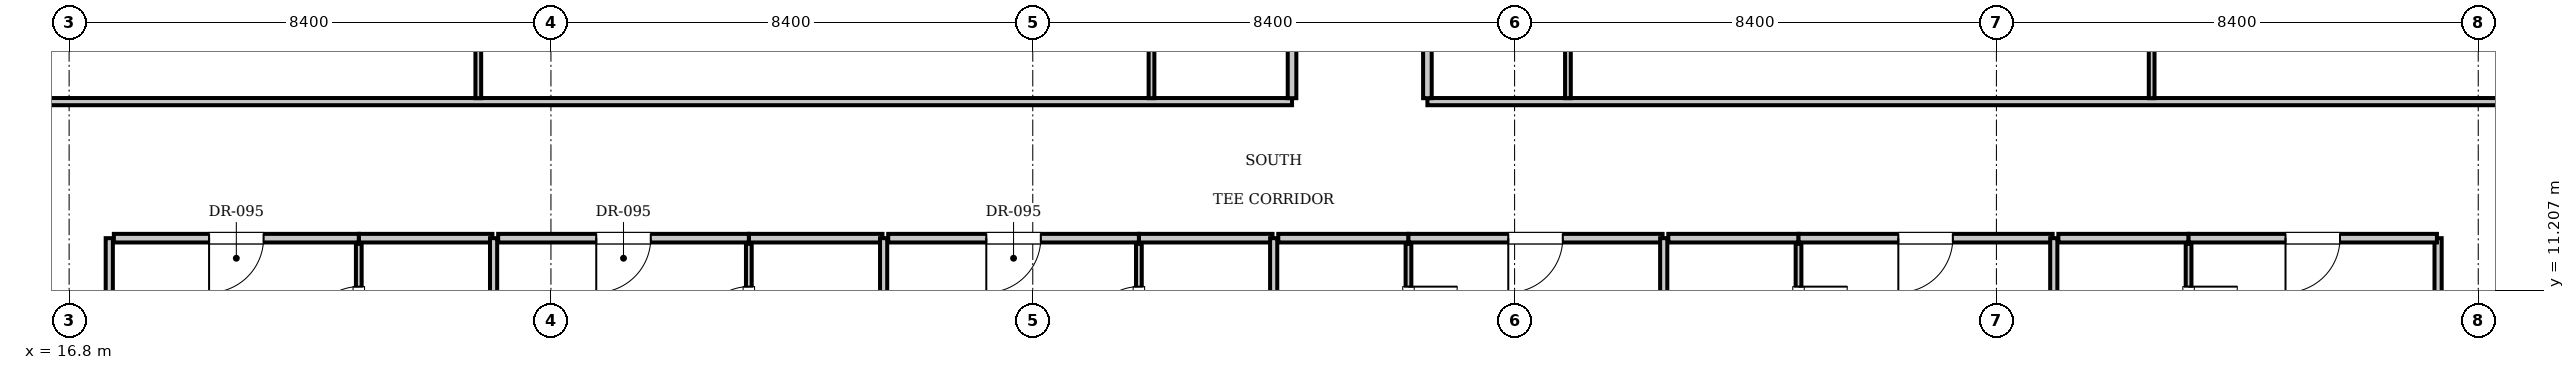
"""IFC4 building model, lengths in metres.
Left out: names, types, materials, properties, quantities, classifications, styles, units other than length and angle.
Written with IfcOpenShell. Run it as: python <this file> out.ifc"""

import sys

from ifc_helpers import new_model, si_unit, direction, frame, frame_2d, origin, place, context, subcontext, project, spatial, rectangle, extrude, element, fill, save


model = new_model("IFC4")
c1 = context("Model", 3, precision=1e-05, world=origin(), true_north=direction((0.0, 1.0)))
c2 = subcontext(c1, "Body", "Model", "MODEL_VIEW")
j1 = project(units=[si_unit("LENGTHUNIT", "METRE"), si_unit("PLANEANGLEUNIT", "RADIAN")], contexts=[c1])
p1 = place(None, origin())
s1 = spatial("IfcSite", under=j1, at=p1, CompositionType="ELEMENT")
p2 = place(p1, origin())
s2 = spatial("IfcBuilding", under=s1, at=p2, CompositionType="ELEMENT")
p3 = place(p2, frame((0.0, 0.0, 150.5)))
s3 = spatial("IfcBuildingStorey", under=s2, at=p3, CompositionType="ELEMENT", Elevation=150.5)
for number, where, z_axis, x_axis in (
    (1, (17.5, 9.0, 0.0), (0.0, 0.0, 1.0), (0.0, 1.0, 0.0)),
    (2, (58.1, 9.0, 0.0), (0.0, 0.0, 1.0), (0.0, 1.0, 0.0)),
):
    element("IfcWall", number, at=place(p3, frame(where, z_axis=z_axis, x_axis=x_axis)), inside=s3, PredefinedType="PARTITIONING", context=c2, shape_type="SweptSolid", body=[
        extrude(rectangle(XDim=3.12, YDim=0.125, at=frame_2d((1.56, 0.0))), origin(), (0.0, 0.0, 1.0), 3.61),
    ])
p4 = place(p3, frame((21.85, 12.12, 0.0), z_axis=(0.0, 0.0, 1.0), x_axis=(1.0, 0.0, 0.0)))
e3 = element("IfcWall", 3, at=p4, inside=s3, PredefinedType="PARTITIONING", context=c2, shape_type="SweptSolid", body=[
    extrude(rectangle(XDim=2.33, YDim=0.15, at=frame_2d((1.165, 0.0))), origin(), (0.0, 0.0, 1.0), 3.61),
])
p5 = place(p3, frame((21.85, 9.68, 0.0), z_axis=(0.0, 0.0, 1.0), x_axis=(0.0, 1.0, 0.0)))
e4 = element("IfcWall", 4, at=p5, inside=s3, PredefinedType="PARTITIONING", context=c2, shape_type="SweptSolid", body=[
    extrude(rectangle(XDim=2.34, YDim=0.1, at=frame_2d((1.17, 0.0))), origin(), (0.0, 0.0, 1.0), 3.61),
])
p6 = place(p5, frame((0.745, 0.0, 0.0)))
e5 = element("IfcOpeningElement", 5, at=p6, cuts=e4, PredefinedType="OPENING", context=c2, shape_type="SweptSolid", body=[
    extrude(rectangle(XDim=0.85, YDim=2.1, at=frame_2d((0.425, 1.05))), frame((0.0, 0.06, 0.0), z_axis=(0.0, -1.0, 0.0), x_axis=(1.0, 0.0, 0.0)), (0.0, 0.0, 1.0), 0.12),
])
p7 = place(p3, frame((17.58, 12.12, 0.0), z_axis=(0.0, 0.0, 1.0), x_axis=(1.0, 0.0, 0.0)))
e6 = element("IfcWall", 6, at=p7, inside=s3, PredefinedType="PARTITIONING", context=c2, shape_type="SweptSolid", body=[
    extrude(rectangle(XDim=4.27, YDim=0.15, at=frame_2d((2.135, 0.0))), origin(), (0.0, 0.0, 1.0), 3.61),
])
p8 = place(p7, frame((1.66, 0.0, 0.0)))
e7 = element("IfcOpeningElement", 7, at=p8, cuts=e6, PredefinedType="OPENING", context=c2, shape_type="SweptSolid", body=[
    extrude(rectangle(XDim=0.95, YDim=2.15, at=frame_2d((0.475, 1.075))), frame((0.0, 0.085, 0.0), z_axis=(0.0, -1.0, 0.0), x_axis=(1.0, 0.0, 0.0)), (0.0, 0.0, 1.0), 0.17),
])
p9 = place(p3, frame((24.2, 4.7, 0.0), z_axis=(0.0, 0.0, 1.0), x_axis=(0.0, 1.0, 0.0)))
e8 = element("IfcWall", 8, at=p9, inside=s3, PredefinedType="PARTITIONING", context=c2, shape_type="SweptSolid", body=[
    extrude(rectangle(XDim=7.42, YDim=0.125, at=frame_2d((3.71, 0.0))), origin(), (0.0, 0.0, 1.0), 3.61),
])
p10 = place(p3, frame((28.65, 12.12, 0.0), z_axis=(0.0, 0.0, 1.0), x_axis=(1.0, 0.0, 0.0)))
e9 = element("IfcWall", 9, at=p10, inside=s3, PredefinedType="PARTITIONING", context=c2, shape_type="SweptSolid", body=[
    extrude(rectangle(XDim=2.33, YDim=0.15, at=frame_2d((1.165, 0.0))), origin(), (0.0, 0.0, 1.0), 3.61),
])
p11 = place(p3, frame((28.65, 9.68, 0.0), z_axis=(0.0, 0.0, 1.0), x_axis=(0.0, 1.0, 0.0)))
e10 = element("IfcWall", 10, at=p11, inside=s3, PredefinedType="PARTITIONING", context=c2, shape_type="SweptSolid", body=[
    extrude(rectangle(XDim=2.34, YDim=0.1, at=frame_2d((1.17, 0.0))), origin(), (0.0, 0.0, 1.0), 3.61),
])
p12 = place(p11, frame((0.745, 0.0, 0.0)))
e11 = element("IfcOpeningElement", 11, at=p12, cuts=e10, PredefinedType="OPENING", context=c2, shape_type="SweptSolid", body=[
    extrude(rectangle(XDim=0.85, YDim=2.1, at=frame_2d((0.425, 1.05))), frame((0.0, 0.06, 0.0), z_axis=(0.0, -1.0, 0.0), x_axis=(1.0, 0.0, 0.0)), (0.0, 0.0, 1.0), 0.12),
])
p13 = place(p3, frame((24.28, 12.12, 0.0), z_axis=(0.0, 0.0, 1.0), x_axis=(1.0, 0.0, 0.0)))
e12 = element("IfcWall", 12, at=p13, inside=s3, PredefinedType="PARTITIONING", context=c2, shape_type="SweptSolid", body=[
    extrude(rectangle(XDim=4.37, YDim=0.15, at=frame_2d((2.185, 0.0))), origin(), (0.0, 0.0, 1.0), 3.61),
])
p14 = place(p13, frame((1.71, 0.0, 0.0)))
e13 = element("IfcOpeningElement", 13, at=p14, cuts=e12, PredefinedType="OPENING", context=c2, shape_type="SweptSolid", body=[
    extrude(rectangle(XDim=0.95, YDim=2.15, at=frame_2d((0.475, 1.075))), frame((0.0, 0.085, 0.0), z_axis=(0.0, -1.0, 0.0), x_axis=(1.0, 0.0, 0.0)), (0.0, 0.0, 1.0), 0.17),
])
p15 = place(p3, frame((31.0, 4.7, 0.0), z_axis=(0.0, 0.0, 1.0), x_axis=(0.0, 1.0, 0.0)))
e14 = element("IfcWall", 14, at=p15, inside=s3, PredefinedType="PARTITIONING", context=c2, shape_type="SweptSolid", body=[
    extrude(rectangle(XDim=7.42, YDim=0.125, at=frame_2d((3.71, 0.0))), origin(), (0.0, 0.0, 1.0), 3.61),
])
p16 = place(p3, frame((35.45, 12.12, 0.0), z_axis=(0.0, 0.0, 1.0), x_axis=(1.0, 0.0, 0.0)))
e15 = element("IfcWall", 15, at=p16, inside=s3, PredefinedType="PARTITIONING", context=c2, shape_type="SweptSolid", body=[
    extrude(rectangle(XDim=2.33, YDim=0.15, at=frame_2d((1.165, 0.0))), origin(), (0.0, 0.0, 1.0), 3.61),
])
p17 = place(p3, frame((35.45, 9.68, 0.0), z_axis=(0.0, 0.0, 1.0), x_axis=(0.0, 1.0, 0.0)))
e16 = element("IfcWall", 16, at=p17, inside=s3, PredefinedType="PARTITIONING", context=c2, shape_type="SweptSolid", body=[
    extrude(rectangle(XDim=2.34, YDim=0.1, at=frame_2d((1.17, 0.0))), origin(), (0.0, 0.0, 1.0), 3.61),
])
p18 = place(p17, frame((0.745, 0.0, 0.0)))
e17 = element("IfcOpeningElement", 17, at=p18, cuts=e16, PredefinedType="OPENING", context=c2, shape_type="SweptSolid", body=[
    extrude(rectangle(XDim=0.85, YDim=2.1, at=frame_2d((0.425, 1.05))), frame((0.0, 0.06, 0.0), z_axis=(0.0, -1.0, 0.0), x_axis=(1.0, 0.0, 0.0)), (0.0, 0.0, 1.0), 0.12),
])
p19 = place(p3, frame((31.08, 12.12, 0.0), z_axis=(0.0, 0.0, 1.0), x_axis=(1.0, 0.0, 0.0)))
e18 = element("IfcWall", 18, at=p19, inside=s3, PredefinedType="PARTITIONING", context=c2, shape_type="SweptSolid", body=[
    extrude(rectangle(XDim=4.37, YDim=0.15, at=frame_2d((2.185, 0.0))), origin(), (0.0, 0.0, 1.0), 3.61),
])
p20 = place(p19, frame((1.71, 0.0, 0.0)))
e19 = element("IfcOpeningElement", 19, at=p20, cuts=e18, PredefinedType="OPENING", context=c2, shape_type="SweptSolid", body=[
    extrude(rectangle(XDim=0.95, YDim=2.15, at=frame_2d((0.475, 1.075))), frame((0.0, 0.085, 0.0), z_axis=(0.0, -1.0, 0.0), x_axis=(1.0, 0.0, 0.0)), (0.0, 0.0, 1.0), 0.17),
])
p21 = place(p3, frame((37.8, 4.7, 0.0), z_axis=(0.0, 0.0, 1.0), x_axis=(0.0, 1.0, 0.0)))
e20 = element("IfcWall", 20, at=p21, inside=s3, PredefinedType="PARTITIONING", context=c2, shape_type="SweptSolid", body=[
    extrude(rectangle(XDim=7.42, YDim=0.125, at=frame_2d((3.71, 0.0))), origin(), (0.0, 0.0, 1.0), 3.293),
])
p22 = place(p3, frame((37.88, 12.12, 0.0), z_axis=(0.0, 0.0, 1.0), x_axis=(1.0, 0.0, 0.0)))
e21 = element("IfcWall", 21, at=p22, inside=s3, PredefinedType="PARTITIONING", context=c2, shape_type="SweptSolid", body=[
    extrude(rectangle(XDim=2.27, YDim=0.15, at=frame_2d((1.135, 0.0))), origin(), (0.0, 0.0, 1.0), 3.61),
])
p23 = place(p3, frame((40.15, 9.68, 0.0), z_axis=(0.0, 0.0, 1.0), x_axis=(0.0, 1.0, 0.0)))
e22 = element("IfcWall", 22, at=p23, inside=s3, PredefinedType="PARTITIONING", context=c2, shape_type="SweptSolid", body=[
    extrude(rectangle(XDim=2.34, YDim=0.1, at=frame_2d((1.17, 0.0))), origin(), (0.0, 0.0, 1.0), 3.61),
])
p24 = place(p23, frame((0.745, 0.0, 0.0)))
e23 = element("IfcOpeningElement", 23, at=p24, cuts=e22, PredefinedType="OPENING", context=c2, shape_type="SweptSolid", body=[
    extrude(rectangle(XDim=0.85, YDim=2.1, at=frame_2d((0.425, 1.05))), frame((0.0, 0.06, 0.0), z_axis=(0.0, -1.0, 0.0), x_axis=(1.0, 0.0, 0.0)), (0.0, 0.0, 1.0), 0.12),
])
p25 = place(p3, frame((40.15, 12.12, 0.0), z_axis=(0.0, 0.0, 1.0), x_axis=(1.0, 0.0, 0.0)))
e24 = element("IfcWall", 24, at=p25, inside=s3, PredefinedType="PARTITIONING", context=c2, shape_type="SweptSolid", body=[
    extrude(rectangle(XDim=4.43, YDim=0.15, at=frame_2d((2.215, 0.0))), origin(), (0.0, 0.0, 1.0), 3.61),
])
p26 = place(p25, frame((1.74, 0.0, 0.0)))
e25 = element("IfcOpeningElement", 25, at=p26, cuts=e24, PredefinedType="OPENING", context=c2, shape_type="SweptSolid", body=[
    extrude(rectangle(XDim=0.95, YDim=2.15, at=frame_2d((0.475, 1.075))), frame((0.0, 0.085, 0.0), z_axis=(0.0, -1.0, 0.0), x_axis=(1.0, 0.0, 0.0)), (0.0, 0.0, 1.0), 0.17),
])
p27 = place(p3, frame((44.6, 4.7, 0.0), z_axis=(0.0, 0.0, 1.0), x_axis=(0.0, 1.0, 0.0)))
e26 = element("IfcWall", 26, at=p27, inside=s3, PredefinedType="PARTITIONING", context=c2, shape_type="SweptSolid", body=[
    extrude(rectangle(XDim=7.42, YDim=0.125, at=frame_2d((3.71, 0.0))), origin(), (0.0, 0.0, 1.0), 3.61),
])
p28 = place(p3, frame((44.68, 12.12, 0.0), z_axis=(0.0, 0.0, 1.0), x_axis=(1.0, 0.0, 0.0)))
e27 = element("IfcWall", 27, at=p28, inside=s3, PredefinedType="PARTITIONING", context=c2, shape_type="SweptSolid", body=[
    extrude(rectangle(XDim=2.27, YDim=0.15, at=frame_2d((1.135, 0.0))), origin(), (0.0, 0.0, 1.0), 3.61),
])
p29 = place(p3, frame((46.95, 9.68, 0.0), z_axis=(0.0, 0.0, 1.0), x_axis=(0.0, 1.0, 0.0)))
e28 = element("IfcWall", 28, at=p29, inside=s3, PredefinedType="PARTITIONING", context=c2, shape_type="SweptSolid", body=[
    extrude(rectangle(XDim=2.34, YDim=0.1, at=frame_2d((1.17, 0.0))), origin(), (0.0, 0.0, 1.0), 3.61),
])
p30 = place(p29, frame((0.745, 0.0, 0.0)))
e29 = element("IfcOpeningElement", 29, at=p30, cuts=e28, PredefinedType="OPENING", context=c2, shape_type="SweptSolid", body=[
    extrude(rectangle(XDim=0.85, YDim=2.1, at=frame_2d((0.425, 1.05))), frame((0.0, 0.06, 0.0), z_axis=(0.0, -1.0, 0.0), x_axis=(1.0, 0.0, 0.0)), (0.0, 0.0, 1.0), 0.12),
])
p31 = place(p3, frame((46.95, 12.12, 0.0), z_axis=(0.0, 0.0, 1.0), x_axis=(1.0, 0.0, 0.0)))
e30 = element("IfcWall", 30, at=p31, inside=s3, PredefinedType="PARTITIONING", context=c2, shape_type="SweptSolid", body=[
    extrude(rectangle(XDim=4.43, YDim=0.15, at=frame_2d((2.215, 0.0))), origin(), (0.0, 0.0, 1.0), 3.61),
])
p32 = place(p31, frame((1.74, 0.0, 0.0)))
e31 = element("IfcOpeningElement", 31, at=p32, cuts=e30, PredefinedType="OPENING", context=c2, shape_type="SweptSolid", body=[
    extrude(rectangle(XDim=0.95, YDim=2.15, at=frame_2d((0.475, 1.075))), frame((0.0, 0.085, 0.0), z_axis=(0.0, -1.0, 0.0), x_axis=(1.0, 0.0, 0.0)), (0.0, 0.0, 1.0), 0.17),
])
p33 = place(p3, frame((51.4, 4.7, 0.0), z_axis=(0.0, 0.0, 1.0), x_axis=(0.0, 1.0, 0.0)))
e32 = element("IfcWall", 32, at=p33, inside=s3, PredefinedType="PARTITIONING", context=c2, shape_type="SweptSolid", body=[
    extrude(rectangle(XDim=7.42, YDim=0.125, at=frame_2d((3.71, 0.0))), origin(), (0.0, 0.0, 1.0), 3.61),
])
p34 = place(p3, frame((51.48, 12.12, 0.0), z_axis=(0.0, 0.0, 1.0), x_axis=(1.0, 0.0, 0.0)))
e33 = element("IfcWall", 33, at=p34, inside=s3, PredefinedType="PARTITIONING", context=c2, shape_type="SweptSolid", body=[
    extrude(rectangle(XDim=2.27, YDim=0.15, at=frame_2d((1.135, 0.0))), origin(), (0.0, 0.0, 1.0), 3.61),
])
p35 = place(p3, frame((53.75, 9.68, 0.0), z_axis=(0.0, 0.0, 1.0), x_axis=(0.0, 1.0, 0.0)))
e34 = element("IfcWall", 34, at=p35, inside=s3, PredefinedType="PARTITIONING", context=c2, shape_type="SweptSolid", body=[
    extrude(rectangle(XDim=2.34, YDim=0.1, at=frame_2d((1.17, 0.0))), origin(), (0.0, 0.0, 1.0), 3.61),
])
p36 = place(p35, frame((0.745, 0.0, 0.0)))
e35 = element("IfcOpeningElement", 35, at=p36, cuts=e34, PredefinedType="OPENING", context=c2, shape_type="SweptSolid", body=[
    extrude(rectangle(XDim=0.85, YDim=2.1, at=frame_2d((0.425, 1.05))), frame((0.0, 0.06, 0.0), z_axis=(0.0, -1.0, 0.0), x_axis=(1.0, 0.0, 0.0)), (0.0, 0.0, 1.0), 0.12),
])
p37 = place(p3, frame((53.75, 12.12, 0.0), z_axis=(0.0, 0.0, 1.0), x_axis=(1.0, 0.0, 0.0)))
e36 = element("IfcWall", 36, at=p37, inside=s3, PredefinedType="PARTITIONING", context=c2, shape_type="SweptSolid", body=[
    extrude(rectangle(XDim=4.33, YDim=0.15, at=frame_2d((2.165, 0.0))), origin(), (0.0, 0.0, 1.0), 3.61),
])
p38 = place(p37, frame((1.69, 0.0, 0.0)))
e37 = element("IfcOpeningElement", 37, at=p38, cuts=e36, PredefinedType="OPENING", context=c2, shape_type="SweptSolid", body=[
    extrude(rectangle(XDim=0.95, YDim=2.15, at=frame_2d((0.475, 1.075))), frame((0.0, 0.085, 0.0), z_axis=(0.0, -1.0, 0.0), x_axis=(1.0, 0.0, 0.0)), (0.0, 0.0, 1.0), 0.17),
])
p39 = place(p3, frame((13.2, 14.5, 0.0), z_axis=(0.0, 0.0, 1.0), x_axis=(1.0, 0.0, 0.0)))
e38 = element("IfcWall", 38, at=p39, inside=s3, PredefinedType="PARTITIONING", context=c2, shape_type="SweptSolid", body=[
    extrude(rectangle(XDim=24.92, YDim=0.125, at=frame_2d((12.46, 0.0))), origin(), (0.0, 0.0, 1.0), 3.61),
])
p40 = place(p3, frame((40.48, 14.5, 0.0), z_axis=(0.0, 0.0, 1.0), x_axis=(1.0, 0.0, 0.0)))
e39 = element("IfcWall", 39, at=p40, inside=s3, PredefinedType="PARTITIONING", context=c2, shape_type="SweptSolid", body=[
    extrude(rectangle(XDim=21.92, YDim=0.125, at=frame_2d((10.96, 0.0))), origin(), (0.0, 0.0, 1.0), 3.61),
])
p41 = place(p3, frame((38.12, 14.56, 0.0), z_axis=(0.0, 0.0, 1.0), x_axis=(0.0, 1.0, 0.0)))
e40 = element("IfcWall", 40, at=p41, inside=s3, PredefinedType="PARTITIONING", context=c2, shape_type="SweptSolid", body=[
    extrude(rectangle(XDim=1.93, YDim=0.15, at=frame_2d((0.965, 0.0))), origin(), (0.0, 0.0, 1.0), 3.61),
])
p42 = place(p3, frame((35.67, 14.56, 0.0), z_axis=(0.0, 0.0, 1.0), x_axis=(0.0, 1.0, 0.0)))
e41 = element("IfcWall", 41, at=p42, inside=s3, PredefinedType="PARTITIONING", context=c2, shape_type="SweptSolid", body=[
    extrude(rectangle(XDim=1.93, YDim=0.1, at=frame_2d((0.965, 0.0))), origin(), (0.0, 0.0, 1.0), 3.61),
])
p43 = place(p3, frame((23.934, 14.56, 0.0), z_axis=(0.0, 0.0, 1.0), x_axis=(0.0, 1.0, 0.0)))
e42 = element("IfcWall", 42, at=p43, inside=s3, PredefinedType="PARTITIONING", context=c2, shape_type="SweptSolid", body=[
    extrude(rectangle(XDim=5.41, YDim=0.1, at=frame_2d((2.705, 0.0))), origin(), (0.0, 0.0, 1.0), 3.61),
])
p44 = place(p43, frame((1.775, 0.0, 0.0)))
e43 = element("IfcOpeningElement", 43, at=p44, cuts=e42, PredefinedType="OPENING", context=c2, shape_type="SweptSolid", body=[
    extrude(rectangle(XDim=0.9, YDim=2.1, at=frame_2d((0.45, 1.05))), frame((0.0, 0.06, 0.0), z_axis=(0.0, -1.0, 0.0), x_axis=(1.0, 0.0, 0.0)), (0.0, 0.0, 1.0), 0.12),
])
p45 = place(p3, frame((40.48, 14.56, 0.0), z_axis=(0.0, 0.0, 1.0), x_axis=(0.0, 1.0, 0.0)))
e44 = element("IfcWall", 44, at=p45, inside=s3, PredefinedType="PARTITIONING", context=c2, shape_type="SweptSolid", body=[
    extrude(rectangle(XDim=1.93, YDim=0.15, at=frame_2d((0.965, 0.0))), origin(), (0.0, 0.0, 1.0), 3.61),
])
p46 = place(p3, frame((42.93, 14.56, 0.0), z_axis=(0.0, 0.0, 1.0), x_axis=(0.0, 1.0, 0.0)))
e45 = element("IfcWall", 45, at=p46, inside=s3, PredefinedType="PARTITIONING", context=c2, shape_type="SweptSolid", body=[
    extrude(rectangle(XDim=1.93, YDim=0.1, at=frame_2d((0.965, 0.0))), origin(), (0.0, 0.0, 1.0), 3.61),
])
p47 = place(p3, frame((53.106, 14.56, 0.0), z_axis=(0.0, 0.0, 1.0), x_axis=(0.0, 1.0, 0.0)))
e46 = element("IfcWall", 46, at=p47, inside=s3, PredefinedType="PARTITIONING", context=c2, shape_type="SweptSolid", body=[
    extrude(rectangle(XDim=5.41, YDim=0.1, at=frame_2d((2.705, 0.0))), origin(), (0.0, 0.0, 1.0), 3.61),
])
p48 = place(p47, frame((2.255, 0.0, 0.0)))
e47 = element("IfcOpeningElement", 47, at=p48, cuts=e46, PredefinedType="OPENING", context=c2, shape_type="SweptSolid", body=[
    extrude(rectangle(XDim=0.9, YDim=2.1, at=frame_2d((0.45, 1.05))), frame((0.0, 0.06, 0.0), z_axis=(0.0, -1.0, 0.0), x_axis=(1.0, 0.0, 0.0)), (0.0, 0.0, 1.0), 0.12),
])
p49 = place(p6, origin())
e48 = element("IfcDoor", 48, at=p49, inside=s3, OperationType="SINGLE_SWING_LEFT", PredefinedType="DOOR", context=c2, shape_type="SweptSolid", body=[
    extrude(rectangle(XDim=0.85, YDim=2.1, at=frame_2d((0.425, 1.05))), frame((0.0, 0.025, 0.0), z_axis=(0.0, -1.0, 0.0), x_axis=(1.0, 0.0, 0.0)), (0.0, 0.0, 1.0), 0.05),
])
fill(e5, e48)
p50 = place(p8, frame((0.95, 0.0, 0.0), z_axis=(0.0, 0.0, 1.0), x_axis=(-1.0, 0.0, 0.0)))
e49 = element("IfcDoor", 49, at=p50, inside=s3, OperationType="SINGLE_SWING_RIGHT", PredefinedType="DOOR", context=c2, shape_type="SweptSolid", body=[
    extrude(rectangle(XDim=0.95, YDim=2.15, at=frame_2d((0.475, 1.075))), frame((0.0, 0.025, 0.0), z_axis=(0.0, -1.0, 0.0), x_axis=(1.0, 0.0, 0.0)), (0.0, 0.0, 1.0), 0.05),
])
fill(e7, e49)
p51 = place(p12, origin())
e50 = element("IfcDoor", 50, at=p51, inside=s3, OperationType="SINGLE_SWING_LEFT", PredefinedType="DOOR", context=c2, shape_type="SweptSolid", body=[
    extrude(rectangle(XDim=0.85, YDim=2.1, at=frame_2d((0.425, 1.05))), frame((0.0, 0.025, 0.0), z_axis=(0.0, -1.0, 0.0), x_axis=(1.0, 0.0, 0.0)), (0.0, 0.0, 1.0), 0.05),
])
fill(e11, e50)
p52 = place(p14, frame((0.95, 0.0, 0.0), z_axis=(0.0, 0.0, 1.0), x_axis=(-1.0, 0.0, 0.0)))
e51 = element("IfcDoor", 51, at=p52, inside=s3, OperationType="SINGLE_SWING_RIGHT", PredefinedType="DOOR", context=c2, shape_type="SweptSolid", body=[
    extrude(rectangle(XDim=0.95, YDim=2.15, at=frame_2d((0.475, 1.075))), frame((0.0, 0.025, 0.0), z_axis=(0.0, -1.0, 0.0), x_axis=(1.0, 0.0, 0.0)), (0.0, 0.0, 1.0), 0.05),
])
fill(e13, e51)
p53 = place(p18, origin())
e52 = element("IfcDoor", 52, at=p53, inside=s3, OperationType="SINGLE_SWING_LEFT", PredefinedType="DOOR", context=c2, shape_type="SweptSolid", body=[
    extrude(rectangle(XDim=0.85, YDim=2.1, at=frame_2d((0.425, 1.05))), frame((0.0, 0.025, 0.0), z_axis=(0.0, -1.0, 0.0), x_axis=(1.0, 0.0, 0.0)), (0.0, 0.0, 1.0), 0.05),
])
fill(e17, e52)
p54 = place(p20, frame((0.95, 0.0, 0.0), z_axis=(0.0, 0.0, 1.0), x_axis=(-1.0, 0.0, 0.0)))
e53 = element("IfcDoor", 53, at=p54, inside=s3, OperationType="SINGLE_SWING_RIGHT", PredefinedType="DOOR", context=c2, shape_type="SweptSolid", body=[
    extrude(rectangle(XDim=0.95, YDim=2.15, at=frame_2d((0.475, 1.075))), frame((0.0, 0.025, 0.0), z_axis=(0.0, -1.0, 0.0), x_axis=(1.0, 0.0, 0.0)), (0.0, 0.0, 1.0), 0.05),
])
fill(e19, e53)
p55 = place(p24, frame((0.85, 0.0, 0.0), z_axis=(0.0, 0.0, 1.0), x_axis=(-1.0, 0.0, 0.0)))
e54 = element("IfcDoor", 54, at=p55, inside=s3, OperationType="SINGLE_SWING_LEFT", PredefinedType="DOOR", context=c2, shape_type="SweptSolid", body=[
    extrude(rectangle(XDim=0.85, YDim=2.1, at=frame_2d((0.425, 1.05))), frame((0.0, 0.025, 0.0), z_axis=(0.0, -1.0, 0.0), x_axis=(1.0, 0.0, 0.0)), (0.0, 0.0, 1.0), 0.05),
])
fill(e23, e54)
p56 = place(p26, frame((0.95, 0.0, 0.0), z_axis=(0.0, 0.0, 1.0), x_axis=(-1.0, 0.0, 0.0)))
e55 = element("IfcDoor", 55, at=p56, inside=s3, OperationType="SINGLE_SWING_RIGHT", PredefinedType="DOOR", context=c2, shape_type="SweptSolid", body=[
    extrude(rectangle(XDim=0.95, YDim=2.15, at=frame_2d((0.475, 1.075))), frame((0.0, 0.025, 0.0), z_axis=(0.0, -1.0, 0.0), x_axis=(1.0, 0.0, 0.0)), (0.0, 0.0, 1.0), 0.05),
])
fill(e25, e55)
p57 = place(p30, frame((0.85, 0.0, 0.0), z_axis=(0.0, 0.0, 1.0), x_axis=(-1.0, 0.0, 0.0)))
e56 = element("IfcDoor", 56, at=p57, inside=s3, OperationType="SINGLE_SWING_LEFT", PredefinedType="DOOR", context=c2, shape_type="SweptSolid", body=[
    extrude(rectangle(XDim=0.85, YDim=2.1, at=frame_2d((0.425, 1.05))), frame((0.0, 0.025, 0.0), z_axis=(0.0, -1.0, 0.0), x_axis=(1.0, 0.0, 0.0)), (0.0, 0.0, 1.0), 0.05),
])
fill(e29, e56)
p58 = place(p32, frame((0.95, 0.0, 0.0), z_axis=(0.0, 0.0, 1.0), x_axis=(-1.0, 0.0, 0.0)))
e57 = element("IfcDoor", 57, at=p58, inside=s3, OperationType="SINGLE_SWING_RIGHT", PredefinedType="DOOR", context=c2, shape_type="SweptSolid", body=[
    extrude(rectangle(XDim=0.95, YDim=2.15, at=frame_2d((0.475, 1.075))), frame((0.0, 0.025, 0.0), z_axis=(0.0, -1.0, 0.0), x_axis=(1.0, 0.0, 0.0)), (0.0, 0.0, 1.0), 0.05),
])
fill(e31, e57)
p59 = place(p36, frame((0.85, 0.0, 0.0), z_axis=(0.0, 0.0, 1.0), x_axis=(-1.0, 0.0, 0.0)))
e58 = element("IfcDoor", 58, at=p59, inside=s3, OperationType="SINGLE_SWING_LEFT", PredefinedType="DOOR", context=c2, shape_type="SweptSolid", body=[
    extrude(rectangle(XDim=0.85, YDim=2.1, at=frame_2d((0.425, 1.05))), frame((0.0, 0.025, 0.0), z_axis=(0.0, -1.0, 0.0), x_axis=(1.0, 0.0, 0.0)), (0.0, 0.0, 1.0), 0.05),
])
fill(e35, e58)
p60 = place(p38, frame((0.95, 0.0, 0.0), z_axis=(0.0, 0.0, 1.0), x_axis=(-1.0, 0.0, 0.0)))
e59 = element("IfcDoor", 59, at=p60, inside=s3, OperationType="SINGLE_SWING_RIGHT", PredefinedType="DOOR", context=c2, shape_type="SweptSolid", body=[
    extrude(rectangle(XDim=0.95, YDim=2.15, at=frame_2d((0.475, 1.075))), frame((0.0, 0.025, 0.0), z_axis=(0.0, -1.0, 0.0), x_axis=(1.0, 0.0, 0.0)), (0.0, 0.0, 1.0), 0.05),
])
fill(e37, e59)
save(model, sys.argv[1])
